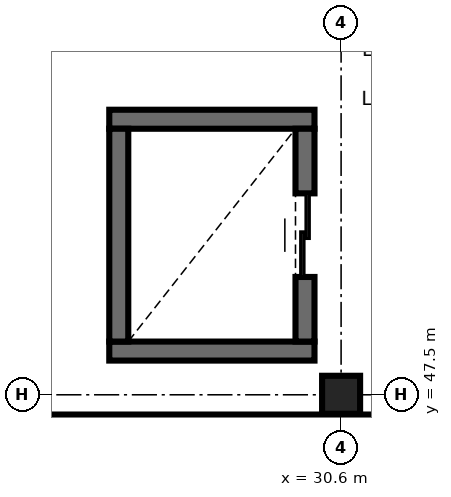
"""IFC4 building model, lengths in metres.
Left out: names, types, materials, properties, quantities, classifications, styles, units other than length and angle.
Written with IfcOpenShell. Run it as: python <this file> out.ifc"""

import sys

from ifc_helpers import new_model, si_unit, direction, frame, frame_2d, origin, origin_2d, place, context, subcontext, project, spatial, rectangle, extrude, element, fill, save


model = new_model("IFC4")
c1 = context("Model", 3, precision=1e-05, world=origin(), true_north=direction((0.0, 1.0)))
c2 = subcontext(c1, "Body", "Model", "MODEL_VIEW")
j1 = project(units=[si_unit("LENGTHUNIT", "METRE"), si_unit("PLANEANGLEUNIT", "RADIAN")], contexts=[c1])
p1 = place(None, origin())
s1 = spatial("IfcSite", under=j1, at=p1, CompositionType="ELEMENT")
p2 = place(p1, origin())
s2 = spatial("IfcBuilding", under=s1, at=p2, CompositionType="ELEMENT")
p3 = place(p2, frame((0.0, 0.0, 26.7)))
s3 = spatial("IfcBuildingStorey", under=s2, at=p3, CompositionType="ELEMENT", Elevation=26.7)
p4 = place(p3, frame((30.6, 47.5, 0.0), z_axis=(0.0, 0.0, 1.0), x_axis=(1.0, 0.0, 0.0)))
e1 = element("IfcColumn", 1, at=p4, inside=s3, PredefinedType="COLUMN", context=c2, shape_type="SweptSolid", body=[
    extrude(rectangle(XDim=0.5, YDim=0.5, at=origin_2d()), origin(), (0.0, 0.0, 1.0), 3.9),
])
for number, where, z_axis, x_axis in (
    (2, (27.55, 48.075, 0.0), (0.0, 0.0, 1.0), (1.0, 0.0, 0.0)),
    (3, (30.25, 51.125, 0.0), (0.0, 0.0, 1.0), (-1.0, 0.0, 0.0)),
):
    element("IfcWall", number, at=place(p3, frame(where, z_axis=z_axis, x_axis=x_axis)), inside=s3, PredefinedType="SHEAR", context=c2, shape_type="SweptSolid", body=[
        extrude(rectangle(XDim=2.7, YDim=0.25, at=frame_2d((1.35, 0.0))), origin(), (0.0, 0.0, 1.0), 3.9),
    ])
p5 = place(p3, frame((27.675, 51.0, 0.0), z_axis=(0.0, 0.0, 1.0), x_axis=(0.0, -1.0, 0.0)))
e4 = element("IfcWall", 4, at=p5, inside=s3, PredefinedType="SHEAR", context=c2, shape_type="SweptSolid", body=[
    extrude(rectangle(XDim=2.8, YDim=0.25, at=frame_2d((1.4, 0.0))), origin(), (0.0, 0.0, 1.0), 3.9),
])
p6 = place(p3, frame((30.125, 48.2, 0.0), z_axis=(0.0, 0.0, 1.0), x_axis=(0.0, 1.0, 0.0)))
e5 = element("IfcWall", 5, at=p6, inside=s3, PredefinedType="SHEAR", context=c2, shape_type="SweptSolid", body=[
    extrude(rectangle(XDim=2.8, YDim=0.25, at=frame_2d((1.4, 0.0))), origin(), (0.0, 0.0, 1.0), 3.9),
])
p7 = place(p6, frame((0.85, 0.0, 0.0)))
e6 = element("IfcOpeningElement", 6, at=p7, cuts=e5, PredefinedType="OPENING", context=c2, shape_type="SweptSolid", body=[
    extrude(rectangle(XDim=1.1, YDim=2.15, at=frame_2d((0.55, 1.075))), frame((0.0, 0.135, 0.0), z_axis=(0.0, -1.0, 0.0), x_axis=(1.0, 0.0, 0.0)), (0.0, 0.0, 1.0), 0.27),
])
p8 = place(p3, frame((14.922, 47.07, 0.0), z_axis=(0.0, 0.0, 1.0), x_axis=(1.0, 0.0, 0.0)))
e7 = element("IfcWall", 7, at=p8, inside=s3, PredefinedType="SOLIDWALL", context=c2, shape_type="SweptSolid", body=[
    extrude(rectangle(XDim=32.478, YDim=0.34, at=frame_2d((16.239, 0.0))), origin(), (0.0, 0.0, 1.0), 3.68),
])
p9 = place(p8, frame((16.608, 0.0, 0.9)))
e8 = element("IfcOpeningElement", 8, at=p9, cuts=e7, PredefinedType="OPENING", context=c2, shape_type="SweptSolid", body=[
    extrude(rectangle(XDim=1.8, YDim=2.1, at=frame_2d((0.9, 1.05))), frame((0.0, 0.18, 0.0), z_axis=(0.0, -1.0, 0.0), x_axis=(1.0, 0.0, 0.0)), (0.0, 0.0, 1.0), 0.36),
])
p10 = place(p8, frame((20.708, 0.0, 0.9)))
e9 = element("IfcOpeningElement", 9, at=p10, cuts=e7, PredefinedType="OPENING", context=c2, shape_type="SweptSolid", body=[
    extrude(rectangle(XDim=1.2, YDim=2.1, at=frame_2d((0.6, 1.05))), frame((0.0, 0.18, 0.0), z_axis=(0.0, -1.0, 0.0), x_axis=(1.0, 0.0, 0.0)), (0.0, 0.0, 1.0), 0.36),
])
p11 = place(p8, frame((26.778, 0.0, 0.9)))
e10 = element("IfcOpeningElement", 10, at=p11, cuts=e7, PredefinedType="OPENING", context=c2, shape_type="SweptSolid", body=[
    extrude(rectangle(XDim=1.8, YDim=2.1, at=frame_2d((0.9, 1.05))), frame((0.0, 0.18, 0.0), z_axis=(0.0, -1.0, 0.0), x_axis=(1.0, 0.0, 0.0)), (0.0, 0.0, 1.0), 0.36),
])
p12 = place(p7, origin())
e11 = element("IfcDoor", 11, at=p12, inside=s3, OperationType="DOUBLE_DOOR_SLIDING", PredefinedType="DOOR", context=c2, shape_type="SweptSolid", body=[
    extrude(rectangle(XDim=1.1, YDim=2.15, at=frame_2d((0.55, 1.075))), frame((0.0, 0.025, 0.0), z_axis=(0.0, -1.0, 0.0), x_axis=(1.0, 0.0, 0.0)), (0.0, 0.0, 1.0), 0.05),
])
fill(e6, e11)
save(model, sys.argv[1])
